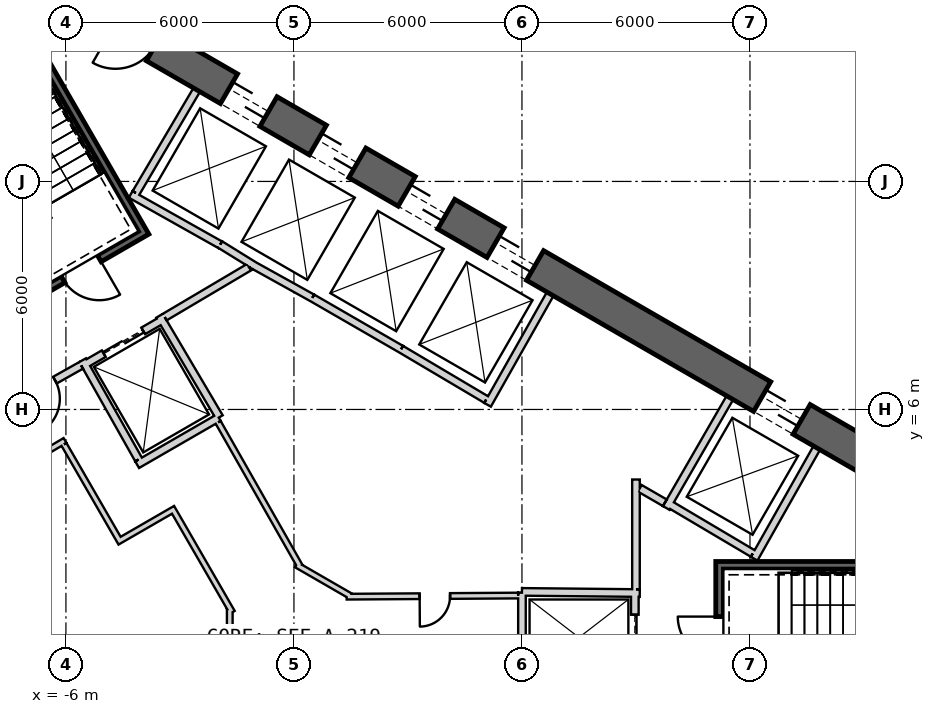
"""IFC4 building model, lengths in metres.
Left out: names, types, materials, properties, quantities, classifications, styles, units other than length and angle.
Written with IfcOpenShell. Run it as: python <this file> out.ifc"""

import sys

from ifc_helpers import new_model, si_unit, direction, frame, frame_2d, origin, place, context, subcontext, project, spatial, rectangle, extrude, element, fill, save


model = new_model("IFC4")
c1 = context("Model", 3, precision=1e-05, world=origin(), true_north=direction((0.0, 1.0)))
c2 = subcontext(c1, "Body", "Model", "MODEL_VIEW")
j1 = project(units=[si_unit("LENGTHUNIT", "METRE"), si_unit("PLANEANGLEUNIT", "RADIAN")], contexts=[c1])
p1 = place(None, origin())
s1 = spatial("IfcSite", under=j1, at=p1, CompositionType="ELEMENT")
p2 = place(p1, origin())
s2 = spatial("IfcBuilding", under=s1, at=p2, CompositionType="ELEMENT")
p3 = place(p2, frame((0.0, 0.0, 156.2)))
s3 = spatial("IfcBuildingStorey", under=s2, at=p3, CompositionType="ELEMENT", Elevation=156.2)
p4 = place(p3, frame((19.475, 2.208, 0.0), z_axis=(0.0, 0.0, 1.0), x_axis=(-0.866028369851, 0.499994862586, 0.0)))
e1 = element("IfcWall", 1, at=p4, inside=s3, PredefinedType="SHEAR", context=c2, shape_type="SweptSolid", body=[
    extrude(rectangle(XDim=31.523, YDim=0.9, at=frame_2d((15.762, 0.0))), origin(), (0.0, 0.0, 1.0), 7.0),
])
p5 = place(p4, frame((7.062, 0.0, 0.0)))
e2 = element("IfcOpeningElement", 2, at=p5, cuts=e1, PredefinedType="OPENING", context=c2, shape_type="SweptSolid", body=[
    extrude(rectangle(XDim=1.2, YDim=2.4, at=frame_2d((0.6, 1.2))), frame((0.0, 0.46, 0.0), z_axis=(0.0, -1.0, 0.0), x_axis=(1.0, 0.0, 0.0)), (0.0, 0.0, 1.0), 0.92),
])
p6 = place(p4, frame((15.162, 0.0, 0.0)))
e3 = element("IfcOpeningElement", 3, at=p6, cuts=e1, PredefinedType="OPENING", context=c2, shape_type="SweptSolid", body=[
    extrude(rectangle(XDim=1.2, YDim=2.4, at=frame_2d((0.6, 1.2))), frame((0.0, 0.46, 0.0), z_axis=(0.0, -1.0, 0.0), x_axis=(1.0, 0.0, 0.0)), (0.0, 0.0, 1.0), 0.92),
])
p7 = place(p4, frame((17.862, 0.0, 0.0)))
e4 = element("IfcOpeningElement", 4, at=p7, cuts=e1, PredefinedType="OPENING", context=c2, shape_type="SweptSolid", body=[
    extrude(rectangle(XDim=1.2, YDim=2.4, at=frame_2d((0.6, 1.2))), frame((0.0, 0.46, 0.0), z_axis=(0.0, -1.0, 0.0), x_axis=(1.0, 0.0, 0.0)), (0.0, 0.0, 1.0), 0.92),
])
p8 = place(p4, frame((20.562, 0.0, 0.0)))
e5 = element("IfcOpeningElement", 5, at=p8, cuts=e1, PredefinedType="OPENING", context=c2, shape_type="SweptSolid", body=[
    extrude(rectangle(XDim=1.2, YDim=2.4, at=frame_2d((0.6, 1.2))), frame((0.0, 0.46, 0.0), z_axis=(0.0, -1.0, 0.0), x_axis=(1.0, 0.0, 0.0)), (0.0, 0.0, 1.0), 0.92),
])
p9 = place(p4, frame((23.262, 0.0, 0.0)))
e6 = element("IfcOpeningElement", 6, at=p9, cuts=e1, PredefinedType="OPENING", context=c2, shape_type="SweptSolid", body=[
    extrude(rectangle(XDim=1.2, YDim=2.4, at=frame_2d((0.6, 1.2))), frame((0.0, 0.46, 0.0), z_axis=(0.0, -1.0, 0.0), x_axis=(1.0, 0.0, 0.0)), (0.0, 0.0, 1.0), 0.92),
])
p10 = place(p4, frame((3.612, 0.0, 0.0)))
e7 = element("IfcOpeningElement", 7, at=p10, cuts=e1, PredefinedType="OPENING", context=c2, shape_type="SweptSolid", body=[
    extrude(rectangle(XDim=1.2, YDim=2.4, at=frame_2d((0.6, 1.2))), frame((0.0, 0.46, 0.0), z_axis=(0.0, -1.0, 0.0), x_axis=(1.0, 0.0, 0.0)), (0.0, 0.0, 1.0), 0.92),
])
p11 = place(p4, frame((26.712, 0.0, 0.0)))
e8 = element("IfcOpeningElement", 8, at=p11, cuts=e1, PredefinedType="OPENING", context=c2, shape_type="SweptSolid", body=[
    extrude(rectangle(XDim=1.2, YDim=2.4, at=frame_2d((0.6, 1.2))), frame((0.0, 0.46, 0.0), z_axis=(0.0, -1.0, 0.0), x_axis=(1.0, 0.0, 0.0)), (0.0, 0.0, 1.0), 0.92),
])
p12 = place(p3, frame((12.11, 2.073, 0.0), z_axis=(0.0, 0.0, 1.0), x_axis=(0.49196600604, 0.870614408852, 0.0)))
e9 = element("IfcWall", 9, at=p12, inside=s3, PredefinedType="PLUMBINGWALL", context=c2, shape_type="SweptSolid", body=[
    extrude(rectangle(XDim=3.35, YDim=0.2, at=frame_2d((1.675, 0.0))), origin(), (0.0, 0.0, 1.0), 6.65),
])
p13 = place(p3, frame((12.073, 2.211, 0.0), z_axis=(0.0, 0.0, 1.0), x_axis=(-0.860436389768, 0.509557866354, 0.0)))
e10 = element("IfcWall", 10, at=p13, inside=s3, PredefinedType="PLUMBINGWALL", context=c2, shape_type="SweptSolid", body=[
    extrude(rectangle(XDim=2.6, YDim=0.2, at=frame_2d((1.3, 0.0))), origin(), (0.0, 0.0, 1.0), 6.65),
])
for number, where, z_axis, x_axis in (
    (11, (9.797, 3.408, 0.0), (0.0, 0.0, 1.0), (0.5, 0.866, 0.0)),
    (12, (6.743, 9.04, 0.0), (0.0, 0.0, 1.0), (-0.492, -0.871, 0.0)),
):
    element("IfcWall", number, at=place(p3, frame(where, z_axis=z_axis, x_axis=x_axis)), inside=s3, PredefinedType="PLUMBINGWALL", context=c2, shape_type="SweptSolid", body=[
        extrude(rectangle(XDim=3.35, YDim=0.2, at=frame_2d((1.675, 0.0))), origin(), (0.0, 0.0, 1.0), 6.65),
    ])
p14 = place(p3, frame((5.058, 6.261, 0.0), z_axis=(0.0, 0.0, 1.0), x_axis=(-0.860395222238, 0.509627375197, 0.0)))
e13 = element("IfcWall", 13, at=p14, inside=s3, PredefinedType="PLUMBINGWALL", context=c2, shape_type="SweptSolid", body=[
    extrude(rectangle(XDim=2.6, YDim=0.2, at=frame_2d((1.3, 0.0))), origin(), (0.0, 0.0, 1.0), 6.65),
])
p15 = place(p3, frame((2.821, 7.586, 0.0), z_axis=(0.0, 0.0, 1.0), x_axis=(-0.866036505625, 0.499980770555, 0.0)))
e14 = element("IfcWall", 14, at=p15, inside=s3, PredefinedType="PLUMBINGWALL", context=c2, shape_type="SweptSolid", body=[
    extrude(rectangle(XDim=2.7, YDim=0.2, at=frame_2d((1.35, 0.0))), origin(), (0.0, 0.0, 1.0), 6.65),
])
p16 = place(p3, frame((-1.941, 10.339, 0.0), z_axis=(0.0, 0.0, 1.0), x_axis=(0.850216889117, -0.526432561171, 0.0)))
e15 = element("IfcWall", 15, at=p16, inside=s3, PredefinedType="PLUMBINGWALL", context=c2, shape_type="SweptSolid", body=[
    extrude(rectangle(XDim=1.078, YDim=0.2, at=frame_2d((0.539, 0.0))), origin(), (0.0, 0.0, 1.0), 6.65),
])
p17 = place(p3, frame((0.483, 8.936, 0.0), z_axis=(0.0, 0.0, 1.0), x_axis=(-0.874269620932, 0.485440655401, 0.0)))
e16 = element("IfcWall", 16, at=p17, inside=s3, PredefinedType="PLUMBINGWALL", context=c2, shape_type="SweptSolid", body=[
    extrude(rectangle(XDim=1.845, YDim=0.2, at=frame_2d((0.922, 0.0))), origin(), (0.0, 0.0, 1.0), 6.65),
])
p18 = place(p3, frame((-4.296, 11.659, 0.0), z_axis=(0.0, 0.0, 1.0), x_axis=(0.871534483978, -0.490334215854, 0.0)))
e17 = element("IfcWall", 17, at=p18, inside=s3, PredefinedType="PLUMBINGWALL", context=c2, shape_type="SweptSolid", body=[
    extrude(rectangle(XDim=2.7, YDim=0.2, at=frame_2d((1.35, 0.0))), origin(), (0.0, 0.0, 1.0), 6.65),
])
p19 = place(p3, frame((-4.158, 11.696, 0.0), z_axis=(0.0, 0.0, 1.0), x_axis=(0.508018930956, 0.861345903683, 0.0)))
e18 = element("IfcWall", 18, at=p19, inside=s3, PredefinedType="PLUMBINGWALL", context=c2, shape_type="SweptSolid", body=[
    extrude(rectangle(XDim=3.15, YDim=0.2, at=frame_2d((1.575, 0.0))), origin(), (0.0, 0.0, 1.0), 6.65),
])
p20 = place(p3, frame((19.2, 1.9, -0.35), z_axis=(0.0, 0.0, 1.0), x_axis=(-1.0, 0.0, 0.0)))
e19 = element("IfcWall", 19, at=p20, inside=s3, PredefinedType="SHEAR", context=c2, shape_type="SweptSolid", body=[
    extrude(rectangle(XDim=8.1, YDim=0.2, at=frame_2d((4.05, 0.0))), origin(), (0.0, 0.0, 1.0), 7.0),
])
p21 = place(p3, frame((11.2, -1.8, -0.35), z_axis=(0.0, 0.0, 1.0), x_axis=(0.0, 1.0, 0.0)))
e20 = element("IfcWall", 20, at=p21, inside=s3, PredefinedType="SHEAR", context=c2, shape_type="SweptSolid", body=[
    extrude(rectangle(XDim=3.6, YDim=0.2, at=frame_2d((1.8, 0.0))), origin(), (0.0, 0.0, 1.0), 7.0),
])
p22 = place(p21, frame((1.25, 0.0, 0.35)))
e21 = element("IfcOpeningElement", 21, at=p22, cuts=e20, PredefinedType="OPENING", context=c2, shape_type="SweptSolid", body=[
    extrude(rectangle(XDim=1.1, YDim=2.1, at=frame_2d((0.55, 1.05))), frame((0.0, 0.11, 0.0), z_axis=(0.0, -1.0, 0.0), x_axis=(1.0, 0.0, 0.0)), (0.0, 0.0, 1.0), 0.22),
])
p23 = place(p3, frame((8.97, 1.2, 0.0), z_axis=(0.0, 0.0, 1.0), x_axis=(0.0, -1.0, 0.0)))
e22 = element("IfcWall", 22, at=p23, inside=s3, PredefinedType="PLUMBINGWALL", context=c2, shape_type="SweptSolid", body=[
    extrude(rectangle(XDim=2.4, YDim=0.2, at=frame_2d((1.2, 0.0))), origin(), (0.0, 0.0, 1.0), 6.65),
])
p24 = place(p23, frame((0.6, 0.0, 0.0)))
e23 = element("IfcOpeningElement", 23, at=p24, cuts=e22, PredefinedType="OPENING", context=c2, shape_type="SweptSolid", body=[
    extrude(rectangle(XDim=1.2, YDim=2.4, at=frame_2d((0.6, 1.2))), frame((0.0, 0.11, 0.0), z_axis=(0.0, -1.0, 0.0), x_axis=(1.0, 0.0, 0.0)), (0.0, 0.0, 1.0), 0.22),
])
p25 = place(p3, frame((6.0, 1.2, 0.0), z_axis=(0.0, 0.0, 1.0), x_axis=(0.999949988, -0.010001074852, 0.0)))
e24 = element("IfcWall", 24, at=p25, inside=s3, PredefinedType="PLUMBINGWALL", context=c2, shape_type="SweptSolid", body=[
    extrude(rectangle(XDim=3.1, YDim=0.2, at=frame_2d((1.55, 0.0))), origin(), (0.0, 0.0, 1.0), 6.65),
])
p26 = place(p3, frame((6.0, -1.1, 0.0), z_axis=(0.0, 0.0, 1.0), x_axis=(0.0, 1.0, 0.0)))
e25 = element("IfcWall", 25, at=p26, inside=s3, PredefinedType="PLUMBINGWALL", context=c2, shape_type="SweptSolid", body=[
    extrude(rectangle(XDim=2.28, YDim=0.2, at=frame_2d((1.14, 0.0))), origin(), (0.0, 0.0, 1.0), 6.65),
])
p27 = place(p3, frame((-7.854, 17.405, -0.35), z_axis=(0.0, 0.0, 1.0), x_axis=(0.499997992926, -0.866026562566, 0.0)))
e26 = element("IfcWall", 26, at=p27, inside=s3, PredefinedType="SHEAR", context=c2, shape_type="SweptSolid", body=[
    extrude(rectangle(XDim=7.9, YDim=0.2, at=frame_2d((3.95, 0.0))), origin(), (0.0, 0.0, 1.0), 7.0),
])
p28 = place(p3, frame((-7.159, 8.8, -0.35), z_axis=(0.0, 0.0, 1.0), x_axis=(0.866047807691, 0.499961193289, 0.0)))
e27 = element("IfcWall", 27, at=p28, inside=s3, PredefinedType="SHEAR", context=c2, shape_type="SweptSolid", body=[
    extrude(rectangle(XDim=3.6, YDim=0.2, at=frame_2d((1.8, 0.0))), origin(), (0.0, 0.0, 1.0), 7.0),
])
p29 = place(p28, frame((1.25, 0.0, 0.35)))
e28 = element("IfcOpeningElement", 28, at=p29, cuts=e27, PredefinedType="OPENING", context=c2, shape_type="SweptSolid", body=[
    extrude(rectangle(XDim=1.1, YDim=2.1, at=frame_2d((0.55, 1.05))), frame((0.0, 0.11, 0.0), z_axis=(0.0, -1.0, 0.0), x_axis=(1.0, 0.0, 0.0)), (0.0, 0.0, 1.0), 0.22),
])
p30 = place(p3, frame((-5.524, 7.168, 0.0), z_axis=(0.0, 0.0, 1.0), x_axis=(0.866024647952, 0.500001309137, 0.0)))
e29 = element("IfcWall", 29, at=p30, inside=s3, PredefinedType="PLUMBINGWALL", context=c2, shape_type="SweptSolid", body=[
    extrude(rectangle(XDim=2.4, YDim=0.2, at=frame_2d((1.2, 0.0))), origin(), (0.0, 0.0, 1.0), 6.65),
])
p31 = place(p30, frame((0.6, 0.0, 0.0)))
e30 = element("IfcOpeningElement", 30, at=p31, cuts=e29, PredefinedType="OPENING", context=c2, shape_type="SweptSolid", body=[
    extrude(rectangle(XDim=1.2, YDim=2.4, at=frame_2d((0.6, 1.2))), frame((0.0, 0.11, 0.0), z_axis=(0.0, -1.0, 0.0), x_axis=(1.0, 0.0, 0.0)), (0.0, 0.0, 1.0), 0.22),
])
p32 = place(p3, frame((-3.538, 8.465, 0.0), z_axis=(0.0, 0.0, 1.0), x_axis=(0.508647062354, -0.860975125052, 0.0)))
e31 = element("IfcWall", 31, at=p32, inside=s3, PredefinedType="PLUMBINGWALL", context=c2, shape_type="SweptSolid", body=[
    extrude(rectangle(XDim=3.1, YDim=0.2, at=frame_2d((1.55, 0.0))), origin(), (0.0, 0.0, 1.0), 6.65),
])
p33 = place(p3, frame((-1.979, 5.786, 0.0), z_axis=(0.0, 0.0, 1.0), x_axis=(-0.866016689309, -0.500015093611, 0.0)))
e32 = element("IfcWall", 32, at=p33, inside=s3, PredefinedType="PLUMBINGWALL", context=c2, shape_type="SweptSolid", body=[
    extrude(rectangle(XDim=2.479, YDim=0.2, at=frame_2d((1.24, 0.0))), origin(), (0.0, 0.0, 1.0), 6.65),
])
p34 = place(p3, frame((-5.562, 7.296, 0.0), z_axis=(0.0, 0.0, 1.0), x_axis=(0.49134651263, -0.870964180966, 0.0)))
e33 = element("IfcWall", 33, at=p34, inside=s3, PredefinedType="PLUMBINGWALL", context=c2, shape_type="SweptSolid", body=[
    extrude(rectangle(XDim=3.0, YDim=0.2, at=frame_2d((1.5, 0.0))), origin(), (0.0, 0.0, 1.0), 6.65),
])
p35 = place(p3, frame((9.0, 1.27, 0.0), z_axis=(0.0, 0.0, 1.0), x_axis=(0.0, 1.0, 0.0)))
e34 = element("IfcWall", 34, at=p35, inside=s3, PredefinedType="PARTITIONING", context=c2, shape_type="SweptSolid", body=[
    extrude(rectangle(XDim=2.887, YDim=0.2, at=frame_2d((1.443, 0.0))), origin(), (0.0, 0.0, 1.0), 6.65),
])
p36 = place(p3, frame((9.76, 3.545, 0.0), z_axis=(0.0, 0.0, 1.0), x_axis=(-0.865966824893, 0.500101447894, 0.0)))
e35 = element("IfcWall", 35, at=p36, inside=s3, PredefinedType="PARTITIONING", context=c2, shape_type="SweptSolid", body=[
    extrude(rectangle(XDim=0.762, YDim=0.2, at=frame_2d((0.381, 0.0))), origin(), (0.0, 0.0, 1.0), 6.65),
])
p37 = place(p3, frame((-1.18, 9.744, 0.0), z_axis=(0.0, 0.0, 1.0), x_axis=(-0.860615607571, -0.509255118781, 0.0)))
e36 = element("IfcWall", 36, at=p37, inside=s3, PredefinedType="PARTITIONING", context=c2, shape_type="SweptSolid", body=[
    extrude(rectangle(XDim=2.581, YDim=0.2, at=frame_2d((1.29, 0.0))), origin(), (0.0, 0.0, 1.0), 6.65),
])
p38 = place(p3, frame((-5.6, 7.16, 0.0), z_axis=(0.0, 0.0, 1.0), x_axis=(-0.871363259478, -0.490638431059, 0.0)))
e37 = element("IfcWall", 37, at=p38, inside=s3, PredefinedType="PARTITIONING", context=c2, shape_type="SweptSolid", body=[
    extrude(rectangle(XDim=2.581, YDim=0.2, at=frame_2d((1.291, 0.0))), origin(), (0.0, 0.0, 1.0), 6.65),
])
p39 = place(p38, frame((0.791, 0.0, 0.0)))
e38 = element("IfcOpeningElement", 38, at=p39, cuts=e37, PredefinedType="OPENING", context=c2, shape_type="SweptSolid", body=[
    extrude(rectangle(XDim=1.0, YDim=2.1, at=frame_2d((0.5, 1.05))), frame((0.0, 0.11, 0.0), z_axis=(0.0, -1.0, 0.0), x_axis=(1.0, 0.0, 0.0)), (0.0, 0.0, 1.0), 0.22),
])
p40 = place(p3, frame((1.388, 1.074, 0.0), z_axis=(0.0, 0.0, 1.0), x_axis=(0.99997856967, 0.006546770205, 0.0)))
e39 = element("IfcWall", 39, at=p40, inside=s3, PredefinedType="PLUMBINGWALL", context=c2, shape_type="SweptSolid", body=[
    extrude(rectangle(XDim=4.512, YDim=0.15, at=frame_2d((2.256, 0.0))), origin(), (0.0, 0.0, 1.0), 6.65),
])
p41 = place(p40, frame((1.92, 0.0, 0.0)))
e40 = element("IfcOpeningElement", 40, at=p41, cuts=e39, PredefinedType="OPENING", context=c2, shape_type="SweptSolid", body=[
    extrude(rectangle(XDim=0.8, YDim=2.1, at=frame_2d((0.4, 1.05))), frame((0.0, 0.085, 0.0), z_axis=(0.0, -1.0, 0.0), x_axis=(1.0, 0.0, 0.0)), (0.0, 0.0, 1.0), 0.17),
])
p42 = place(p3, frame((0.062, 1.914, 0.0), z_axis=(0.0, 0.0, 1.0), x_axis=(0.866018462269, -0.500012022864, 0.0)))
e41 = element("IfcWall", 41, at=p42, inside=s3, PredefinedType="PLUMBINGWALL", context=c2, shape_type="SweptSolid", body=[
    extrude(rectangle(XDim=1.654, YDim=0.15, at=frame_2d((0.827, 0.0))), origin(), (0.0, 0.0, 1.0), 6.65),
])
p43 = place(p3, frame((-1.994, 5.661, 0.0), z_axis=(0.0, 0.0, 1.0), x_axis=(0.494341211302, -0.869267948798, 0.0)))
e42 = element("IfcWall", 42, at=p43, inside=s3, PredefinedType="PLUMBINGWALL", context=c2, shape_type="SweptSolid", body=[
    extrude(rectangle(XDim=4.361, YDim=0.15, at=frame_2d((2.18, 0.0))), origin(), (0.0, 0.0, 1.0), 6.65),
])
p44 = place(p3, frame((-6.024, 5.183, 0.0), z_axis=(0.0, 0.0, 1.0), x_axis=(-0.860126804455, -0.510080268447, 0.0)))
e43 = element("IfcWall", 43, at=p44, inside=s3, PredefinedType="PLUMBINGWALL", context=c2, shape_type="SweptSolid", body=[
    extrude(rectangle(XDim=2.24, YDim=0.15, at=frame_2d((1.12, 0.0))), origin(), (0.0, 0.0, 1.0), 6.65),
])
p45 = place(p3, frame((-4.551, 2.482, 0.0), z_axis=(0.0, 0.0, 1.0), x_axis=(-0.499990139034, 0.866031096941, 0.0)))
e44 = element("IfcWall", 44, at=p45, inside=s3, PredefinedType="PLUMBINGWALL", context=c2, shape_type="SweptSolid", body=[
    extrude(rectangle(XDim=3.0, YDim=0.15, at=frame_2d((1.5, 0.0))), origin(), (0.0, 0.0, 1.0), 6.65),
])
p46 = place(p3, frame((-3.116, 3.397, 0.0), z_axis=(0.0, 0.0, 1.0), x_axis=(-0.866053003207, -0.499952193351, 0.0)))
e45 = element("IfcWall", 45, at=p46, inside=s3, PredefinedType="PLUMBINGWALL", context=c2, shape_type="SweptSolid", body=[
    extrude(rectangle(XDim=1.625, YDim=0.15, at=frame_2d((0.812, 0.0))), origin(), (0.0, 0.0, 1.0), 6.65),
])
p47 = place(p3, frame((-1.624, 0.663, 0.0), z_axis=(0.0, 0.0, 1.0), x_axis=(-0.500035348339, 0.866004994449, 0.0)))
e46 = element("IfcWall", 46, at=p47, inside=s3, PredefinedType="PLUMBINGWALL", context=c2, shape_type="SweptSolid", body=[
    extrude(rectangle(XDim=3.039, YDim=0.15, at=frame_2d((1.52, 0.0))), origin(), (0.0, 0.0, 1.0), 6.65),
])
p48 = place(p3, frame((-1.689, -0.905, 0.0), z_axis=(0.0, 0.0, 1.0), x_axis=(0.0, 1.0, 0.0)))
e47 = element("IfcWall", 47, at=p48, inside=s3, PredefinedType="PLUMBINGWALL", context=c2, shape_type="SweptSolid", body=[
    extrude(rectangle(XDim=1.656, YDim=0.15, at=frame_2d((0.828, 0.0))), origin(), (0.0, 0.0, 1.0), 6.65),
])
p49 = place(p22, origin())
e48 = element("IfcDoor", 48, at=p49, inside=s3, OperationType="SINGLE_SWING_RIGHT", PredefinedType="USERDEFINED", context=c2, shape_type="SweptSolid", body=[
    extrude(rectangle(XDim=1.1, YDim=2.1, at=frame_2d((0.55, 1.05))), frame((0.0, 0.025, 0.0), z_axis=(0.0, -1.0, 0.0), x_axis=(1.0, 0.0, 0.0)), (0.0, 0.0, 1.0), 0.05),
])
fill(e21, e48)
p50 = place(p24, origin())
e49 = element("IfcDoor", 49, at=p50, inside=s3, OperationType="SLIDING_TO_LEFT", PredefinedType="USERDEFINED", context=c2, shape_type="SweptSolid", body=[
    extrude(rectangle(XDim=1.2, YDim=2.4, at=frame_2d((0.6, 1.2))), frame((0.0, 0.025, 0.0), z_axis=(0.0, -1.0, 0.0), x_axis=(1.0, 0.0, 0.0)), (0.0, 0.0, 1.0), 0.05),
])
fill(e23, e49)
p51 = place(p29, origin())
e50 = element("IfcDoor", 50, at=p51, inside=s3, OperationType="SINGLE_SWING_RIGHT", PredefinedType="USERDEFINED", context=c2, shape_type="SweptSolid", body=[
    extrude(rectangle(XDim=1.1, YDim=2.1, at=frame_2d((0.55, 1.05))), frame((0.0, 0.025, 0.0), z_axis=(0.0, -1.0, 0.0), x_axis=(1.0, 0.0, 0.0)), (0.0, 0.0, 1.0), 0.05),
])
fill(e28, e50)
p52 = place(p39, origin())
e51 = element("IfcDoor", 51, at=p52, inside=s3, OperationType="SINGLE_SWING_RIGHT", PredefinedType="USERDEFINED", context=c2, shape_type="SweptSolid", body=[
    extrude(rectangle(XDim=1.0, YDim=2.1, at=frame_2d((0.5, 1.05))), frame((0.0, 0.025, 0.0), z_axis=(0.0, -1.0, 0.0), x_axis=(1.0, 0.0, 0.0)), (0.0, 0.0, 1.0), 0.05),
])
fill(e38, e51)
p53 = place(p31, origin())
e52 = element("IfcDoor", 52, at=p53, inside=s3, OperationType="SLIDING_TO_LEFT", PredefinedType="USERDEFINED", context=c2, shape_type="SweptSolid", body=[
    extrude(rectangle(XDim=1.2, YDim=2.4, at=frame_2d((0.6, 1.2))), frame((0.0, 0.025, 0.0), z_axis=(0.0, -1.0, 0.0), x_axis=(1.0, 0.0, 0.0)), (0.0, 0.0, 1.0), 0.05),
])
fill(e30, e52)
p54 = place(p41, origin())
e53 = element("IfcDoor", 53, at=p54, inside=s3, OperationType="SINGLE_SWING_LEFT", PredefinedType="USERDEFINED", context=c2, shape_type="SweptSolid", body=[
    extrude(rectangle(XDim=0.8, YDim=2.1, at=frame_2d((0.4, 1.05))), frame((0.0, 0.025, 0.0), z_axis=(0.0, -1.0, 0.0), x_axis=(1.0, 0.0, 0.0)), (0.0, 0.0, 1.0), 0.05),
])
fill(e40, e53)
p55 = place(p5, origin())
e54 = element("IfcDoor", 54, at=p55, inside=s3, OperationType="SLIDING_TO_LEFT", PredefinedType="USERDEFINED", context=c2, shape_type="SweptSolid", body=[
    extrude(rectangle(XDim=1.2, YDim=2.4, at=frame_2d((0.6, 1.2))), frame((0.0, 0.025, 0.0), z_axis=(0.0, -1.0, 0.0), x_axis=(1.0, 0.0, 0.0)), (0.0, 0.0, 1.0), 0.05),
])
fill(e2, e54)
p56 = place(p6, origin())
e55 = element("IfcDoor", 55, at=p56, inside=s3, OperationType="SLIDING_TO_LEFT", PredefinedType="USERDEFINED", context=c2, shape_type="SweptSolid", body=[
    extrude(rectangle(XDim=1.2, YDim=2.4, at=frame_2d((0.6, 1.2))), frame((0.0, 0.025, 0.0), z_axis=(0.0, -1.0, 0.0), x_axis=(1.0, 0.0, 0.0)), (0.0, 0.0, 1.0), 0.05),
])
fill(e3, e55)
p57 = place(p7, origin())
e56 = element("IfcDoor", 56, at=p57, inside=s3, OperationType="SLIDING_TO_LEFT", PredefinedType="USERDEFINED", context=c2, shape_type="SweptSolid", body=[
    extrude(rectangle(XDim=1.2, YDim=2.4, at=frame_2d((0.6, 1.2))), frame((0.0, 0.025, 0.0), z_axis=(0.0, -1.0, 0.0), x_axis=(1.0, 0.0, 0.0)), (0.0, 0.0, 1.0), 0.05),
])
fill(e4, e56)
p58 = place(p8, origin())
e57 = element("IfcDoor", 57, at=p58, inside=s3, OperationType="SLIDING_TO_LEFT", PredefinedType="USERDEFINED", context=c2, shape_type="SweptSolid", body=[
    extrude(rectangle(XDim=1.2, YDim=2.4, at=frame_2d((0.6, 1.2))), frame((0.0, 0.025, 0.0), z_axis=(0.0, -1.0, 0.0), x_axis=(1.0, 0.0, 0.0)), (0.0, 0.0, 1.0), 0.05),
])
fill(e5, e57)
p59 = place(p9, origin())
e58 = element("IfcDoor", 58, at=p59, inside=s3, OperationType="SLIDING_TO_LEFT", PredefinedType="USERDEFINED", context=c2, shape_type="SweptSolid", body=[
    extrude(rectangle(XDim=1.2, YDim=2.4, at=frame_2d((0.6, 1.2))), frame((0.0, 0.025, 0.0), z_axis=(0.0, -1.0, 0.0), x_axis=(1.0, 0.0, 0.0)), (0.0, 0.0, 1.0), 0.05),
])
fill(e6, e58)
save(model, sys.argv[1])
